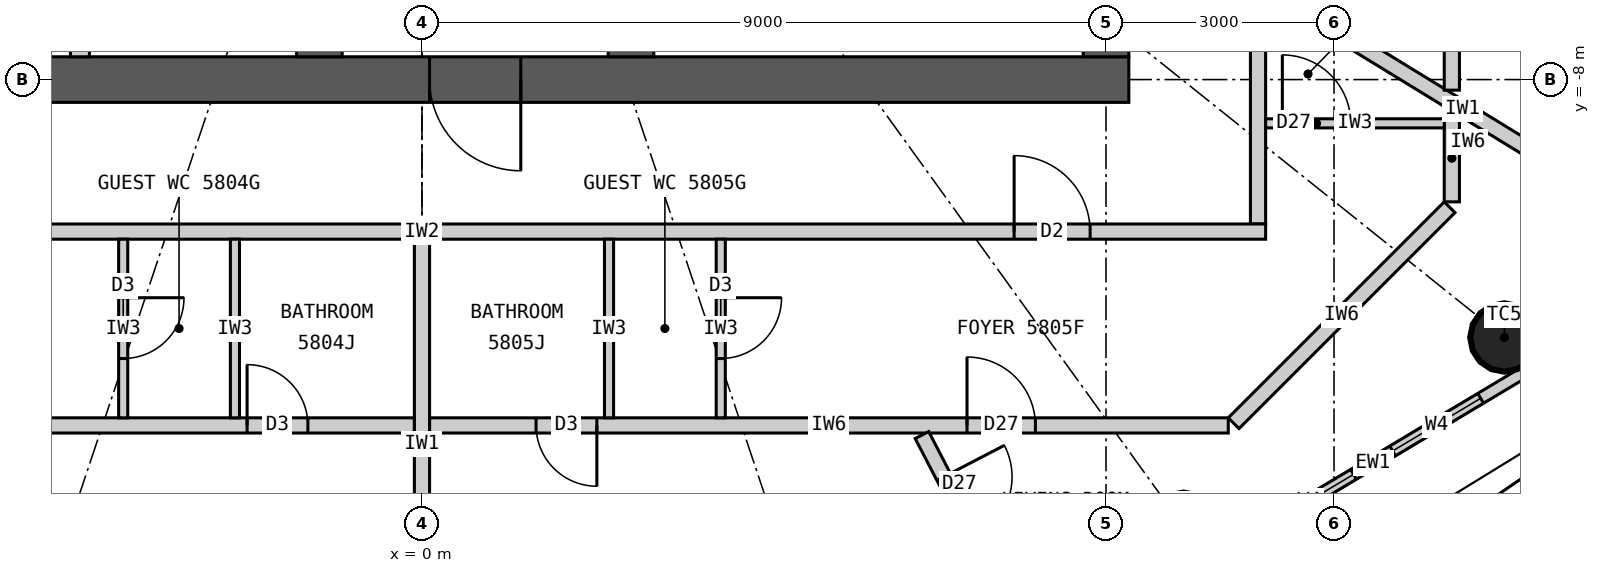
"""IFC4 building model, lengths in metres.
Left out: names, types, materials, properties, quantities, classifications, styles, units other than length and angle.
Written with IfcOpenShell. Run it as: python <this file> out.ifc"""

import sys

from ifc_helpers import new_model, si_unit, direction, frame, frame_2d, origin, origin_2d, place, context, subcontext, project, spatial, rectangle, circle, extrude, element, fill, save


model = new_model("IFC4")
c1 = context("Model", 3, precision=1e-05, world=origin(), true_north=direction((0.0, 1.0)))
c2 = subcontext(c1, "Body", "Model", "MODEL_VIEW")
j1 = project(units=[si_unit("LENGTHUNIT", "METRE"), si_unit("PLANEANGLEUNIT", "RADIAN")], contexts=[c1])
p1 = place(None, origin())
s1 = spatial("IfcSite", under=j1, at=p1, CompositionType="ELEMENT")
p2 = place(p1, origin())
s2 = spatial("IfcBuilding", under=s1, at=p2, CompositionType="ELEMENT")
p3 = place(p2, frame((0.0, 0.0, 216.0)))
s3 = spatial("IfcBuildingStorey", under=s2, at=p3, CompositionType="ELEMENT", Elevation=216.0)
for number, where, z_axis, x_axis in (
    (1, (10.019, -13.883, 0.0), (0.0, 0.0, 1.0), (1.0, 0.0, 0.0)),
    (2, (14.241, -11.393, 0.0), (0.0, 0.0, 1.0), (1.0, 0.0, 0.0)),
):
    element("IfcColumn", number, at=place(p3, frame(where, z_axis=z_axis, x_axis=x_axis)), inside=s3, PredefinedType="COLUMN", context=c2, shape_type="SweptSolid", body=[
        extrude(circle(Radius=0.45, at=origin_2d()), origin(), (0.0, 0.0, 1.0), 3.3),
    ])
p4 = place(p3, frame((9.3, -8.0, 0.0), z_axis=(0.0, 0.0, 1.0), x_axis=(-1.0, 0.0, 0.0)))
e3 = element("IfcWall", 3, at=p4, inside=s3, PredefinedType="SHEAR", context=c2, shape_type="SweptSolid", body=[
    extrude(rectangle(XDim=18.6, YDim=0.6, at=frame_2d((9.3, 0.0))), origin(), (0.0, 0.0, 1.0), 3.3),
])
p5 = place(p4, frame((8.0, 0.0, 0.0)))
e4 = element("IfcOpeningElement", 4, at=p5, cuts=e3, PredefinedType="OPENING", context=c2, shape_type="SweptSolid", body=[
    extrude(rectangle(XDim=1.2, YDim=2.2, at=frame_2d((0.6, 1.1))), frame((0.0, 0.31, 0.0), z_axis=(0.0, -1.0, 0.0), x_axis=(1.0, 0.0, 0.0)), (0.0, 0.0, 1.0), 0.62),
])
p6 = place(p4, frame((15.6, 0.0, 0.0)))
e5 = element("IfcOpeningElement", 5, at=p6, cuts=e3, PredefinedType="OPENING", context=c2, shape_type="SweptSolid", body=[
    extrude(rectangle(XDim=0.9, YDim=2.2, at=frame_2d((0.45, 1.1))), frame((0.0, 0.31, 0.0), z_axis=(0.0, -1.0, 0.0), x_axis=(1.0, 0.0, 0.0)), (0.0, 0.0, 1.0), 0.62),
])
p7 = place(p3, frame((9.0, -7.7, 0.0), z_axis=(0.0, 0.0, 1.0), x_axis=(0.0, 1.0, 0.0)))
e6 = element("IfcWall", 6, at=p7, inside=s3, PredefinedType="SHEAR", context=c2, shape_type="SweptSolid", body=[
    extrude(rectangle(XDim=15.4, YDim=0.6, at=frame_2d((7.7, 0.0))), origin(), (0.0, 0.0, 1.0), 3.3),
])
p8 = place(p7, frame((6.8, 0.0, 0.0)))
e7 = element("IfcOpeningElement", 7, at=p8, cuts=e6, PredefinedType="OPENING", context=c2, shape_type="SweptSolid", body=[
    extrude(rectangle(XDim=1.8, YDim=2.2, at=frame_2d((0.9, 1.1))), frame((0.0, 0.31, 0.0), z_axis=(0.0, -1.0, 0.0), x_axis=(1.0, 0.0, 0.0)), (0.0, 0.0, 1.0), 0.62),
])
p9 = place(p3, frame((2.75, -7.7, 0.0), z_axis=(0.0, 0.0, 1.0), x_axis=(0.0, 1.0, 0.0)))
e8 = element("IfcWall", 8, at=p9, inside=s3, PredefinedType="SHEAR", context=c2, shape_type="SweptSolid", body=[
    extrude(rectangle(XDim=3.2, YDim=0.6, at=frame_2d((1.6, 0.0))), origin(), (0.0, 0.0, 1.0), 3.3),
])
p10 = place(p9, frame((1.175, 0.0, 0.0)))
e9 = element("IfcOpeningElement", 9, at=p10, cuts=e8, PredefinedType="OPENING", context=c2, shape_type="SweptSolid", body=[
    extrude(rectangle(XDim=1.1, YDim=2.2, at=frame_2d((0.55, 1.1))), frame((0.0, 0.31, 0.0), z_axis=(0.0, -1.0, 0.0), x_axis=(1.0, 0.0, 0.0)), (0.0, 0.0, 1.0), 0.62),
])
p11 = place(p3, frame((-1.35, -7.7, 0.0), z_axis=(0.0, 0.0, 1.0), x_axis=(0.0, 1.0, 0.0)))
e10 = element("IfcWall", 10, at=p11, inside=s3, PredefinedType="SHEAR", context=c2, shape_type="SweptSolid", body=[
    extrude(rectangle(XDim=3.2, YDim=0.6, at=frame_2d((1.6, 0.0))), origin(), (0.0, 0.0, 1.0), 3.3),
])
p12 = place(p11, frame((1.05, 0.0, 0.0)))
e11 = element("IfcOpeningElement", 11, at=p12, cuts=e10, PredefinedType="OPENING", context=c2, shape_type="SweptSolid", body=[
    extrude(rectangle(XDim=1.1, YDim=2.2, at=frame_2d((0.55, 1.1))), frame((0.0, 0.31, 0.0), z_axis=(0.0, -1.0, 0.0), x_axis=(1.0, 0.0, 0.0)), (0.0, 0.0, 1.0), 0.62),
])
p13 = place(p3, frame((-4.5, -7.7, 0.0), z_axis=(0.0, 0.0, 1.0), x_axis=(0.0, 1.0, 0.0)))
e12 = element("IfcWall", 12, at=p13, inside=s3, PredefinedType="PARTITIONING", context=c2, shape_type="SweptSolid", body=[
    extrude(rectangle(XDim=3.2, YDim=0.25, at=frame_2d((1.6, 0.0))), origin(), (0.0, 0.0, 1.0), 3.3),
])
p14 = place(p3, frame((10.346, -14.336, 0.0), z_axis=(0.0, 0.0, 1.0), x_axis=(0.85822150553, 0.513279502265, 0.0)))
e13 = element("IfcWall", 13, at=p14, inside=s3, PredefinedType="ELEMENTEDWALL", context=c2, shape_type="SweptSolid", body=[
    extrude(rectangle(XDim=5.05, YDim=0.15, at=frame_2d((2.525, 0.0))), origin(), (0.0, 0.0, 1.0), 3.12),
])
p15 = place(p14, frame((0.875, 0.0, 0.9)))
e14 = element("IfcOpeningElement", 14, at=p15, cuts=e13, PredefinedType="OPENING", context=c2, shape_type="SweptSolid", body=[
    extrude(rectangle(XDim=1.35, YDim=1.9, at=frame_2d((0.675, 0.95))), frame((0.0, 0.085, 0.0), z_axis=(0.0, -1.0, 0.0), x_axis=(1.0, 0.0, 0.0)), (0.0, 0.0, 1.0), 0.17),
])
p16 = place(p14, frame((2.825, 0.0, 0.9)))
e15 = element("IfcOpeningElement", 15, at=p16, cuts=e13, PredefinedType="OPENING", context=c2, shape_type="SweptSolid", body=[
    extrude(rectangle(XDim=1.35, YDim=1.9, at=frame_2d((0.675, 0.95))), frame((0.0, 0.085, 0.0), z_axis=(0.0, -1.0, 0.0), x_axis=(1.0, 0.0, 0.0)), (0.0, 0.0, 1.0), 0.17),
])
p17 = place(p3, frame((11.0, -9.9, 0.0), z_axis=(0.0, 0.0, 1.0), x_axis=(0.0, 1.0, 0.0)))
e16 = element("IfcWall", 16, at=p17, inside=s3, PredefinedType="PARTITIONING", context=c2, shape_type="SweptSolid", body=[
    extrude(rectangle(XDim=7.416, YDim=0.2, at=frame_2d((3.708, 0.0))), origin(), (0.0, 0.0, 1.0), 3.12),
])
p18 = place(p3, frame((11.1, -10.0, 0.0), z_axis=(0.0, 0.0, 1.0), x_axis=(-1.0, 0.0, 0.0)))
e17 = element("IfcWall", 17, at=p18, inside=s3, PredefinedType="PARTITIONING", context=c2, shape_type="SweptSolid", body=[
    extrude(rectangle(XDim=22.2, YDim=0.2, at=frame_2d((11.1, 0.0))), origin(), (0.0, 0.0, 1.0), 3.12),
])
p19 = place(p18, frame((18.864, 0.0, 0.0)))
e18 = element("IfcOpeningElement", 18, at=p19, cuts=e17, PredefinedType="OPENING", context=c2, shape_type="SweptSolid", body=[
    extrude(rectangle(XDim=1.0, YDim=2.2, at=frame_2d((0.5, 1.1))), frame((0.0, 0.11, 0.0), z_axis=(0.0, -1.0, 0.0), x_axis=(1.0, 0.0, 0.0)), (0.0, 0.0, 1.0), 0.22),
])
p20 = place(p18, frame((2.309, 0.0, 0.0)))
e19 = element("IfcOpeningElement", 19, at=p20, cuts=e17, PredefinedType="OPENING", context=c2, shape_type="SweptSolid", body=[
    extrude(rectangle(XDim=1.0, YDim=2.2, at=frame_2d((0.5, 1.1))), frame((0.0, 0.11, 0.0), z_axis=(0.0, -1.0, 0.0), x_axis=(1.0, 0.0, 0.0)), (0.0, 0.0, 1.0), 0.22),
])
p21 = place(p3, frame((0.0, -10.1, 0.0), z_axis=(0.0, 0.0, 1.0), x_axis=(0.0, -1.0, 0.0)))
e20 = element("IfcWall", 20, at=p21, inside=s3, PredefinedType="PARTITIONING", context=c2, shape_type="SweptSolid", body=[
    extrude(rectangle(XDim=5.4, YDim=0.2, at=frame_2d((2.7, 0.0))), origin(), (0.0, 0.0, 1.0), 2.42),
])
p22 = place(p3, frame((11.1, -6.797, 0.0), z_axis=(0.0, 0.0, 1.0), x_axis=(0.852799818179, -0.522237943963, 0.0)))
e21 = element("IfcWall", 21, at=p22, inside=s3, PredefinedType="PARTITIONING", context=c2, shape_type="SweptSolid", body=[
    extrude(rectangle(XDim=6.077, YDim=0.2, at=frame_2d((3.039, 0.0))), origin(), (0.0, 0.0, 1.0), 3.12),
])
p23 = place(p3, frame((-10.609, -12.55, 0.0), z_axis=(0.0, 0.0, 1.0), x_axis=(1.0, 0.0, 0.0)))
e22 = element("IfcWall", 22, at=p23, inside=s3, PredefinedType="PARTITIONING", context=c2, shape_type="SweptSolid", body=[
    extrude(rectangle(XDim=10.508, YDim=0.2, at=frame_2d((5.254, 0.0))), origin(), (0.0, 0.0, 1.0), 3.12),
])
p24 = place(p23, frame((8.308, 0.0, 0.0)))
e23 = element("IfcOpeningElement", 23, at=p24, cuts=e22, PredefinedType="OPENING", context=c2, shape_type="SweptSolid", body=[
    extrude(rectangle(XDim=0.8, YDim=2.1, at=frame_2d((0.4, 1.05))), frame((0.0, 0.11, 0.0), z_axis=(0.0, -1.0, 0.0), x_axis=(1.0, 0.0, 0.0)), (0.0, 0.0, 1.0), 0.22),
])
p25 = place(p3, frame((-3.931, -10.1, 0.0), z_axis=(0.0, 0.0, 1.0), x_axis=(0.0, -1.0, 0.0)))
e24 = element("IfcWall", 24, at=p25, inside=s3, PredefinedType="PARTITIONING", context=c2, shape_type="SweptSolid", body=[
    extrude(rectangle(XDim=2.35, YDim=0.12, at=frame_2d((1.175, 0.0))), origin(), (0.0, 0.0, 1.0), 3.12),
])
p26 = place(p25, frame((0.77, 0.0, 0.0)))
e25 = element("IfcOpeningElement", 25, at=p26, cuts=e24, PredefinedType="OPENING", context=c2, shape_type="SweptSolid", body=[
    extrude(rectangle(XDim=0.8, YDim=2.1, at=frame_2d((0.4, 1.05))), frame((0.0, 0.07, 0.0), z_axis=(0.0, -1.0, 0.0), x_axis=(1.0, 0.0, 0.0)), (0.0, 0.0, 1.0), 0.14),
])
p27 = place(p3, frame((-2.461, -10.1, 0.0), z_axis=(0.0, 0.0, 1.0), x_axis=(0.0, -1.0, 0.0)))
e26 = element("IfcWall", 26, at=p27, inside=s3, PredefinedType="PARTITIONING", context=c2, shape_type="SweptSolid", body=[
    extrude(rectangle(XDim=2.35, YDim=0.12, at=frame_2d((1.175, 0.0))), origin(), (0.0, 0.0, 1.0), 3.12),
])
p28 = place(p3, frame((0.101, -12.55, 0.0), z_axis=(0.0, 0.0, 1.0), x_axis=(1.0, 0.0, 0.0)))
e27 = element("IfcWall", 27, at=p28, inside=s3, PredefinedType="PARTITIONING", context=c2, shape_type="SweptSolid", body=[
    extrude(rectangle(XDim=10.508, YDim=0.2, at=frame_2d((5.254, 0.0))), origin(), (0.0, 0.0, 1.0), 3.12),
])
p29 = place(p28, frame((1.4, 0.0, 0.0)))
e28 = element("IfcOpeningElement", 28, at=p29, cuts=e27, PredefinedType="OPENING", context=c2, shape_type="SweptSolid", body=[
    extrude(rectangle(XDim=0.8, YDim=2.1, at=frame_2d((0.4, 1.05))), frame((0.0, 0.11, 0.0), z_axis=(0.0, -1.0, 0.0), x_axis=(1.0, 0.0, 0.0)), (0.0, 0.0, 1.0), 0.22),
])
p30 = place(p28, frame((7.07, 0.0, 0.0)))
e29 = element("IfcOpeningElement", 29, at=p30, cuts=e27, PredefinedType="OPENING", context=c2, shape_type="SweptSolid", body=[
    extrude(rectangle(XDim=0.9, YDim=2.1, at=frame_2d((0.45, 1.05))), frame((0.0, 0.11, 0.0), z_axis=(0.0, -1.0, 0.0), x_axis=(1.0, 0.0, 0.0)), (0.0, 0.0, 1.0), 0.22),
])
p31 = place(p3, frame((10.679, -12.521, 0.0), z_axis=(0.0, 0.0, 1.0), x_axis=(0.707106781187, 0.707106781187, 0.0)))
e30 = element("IfcWall", 30, at=p31, inside=s3, PredefinedType="PARTITIONING", context=c2, shape_type="SweptSolid", body=[
    extrude(rectangle(XDim=4.019, YDim=0.2, at=frame_2d((2.009, 0.0))), origin(), (0.0, 0.0, 1.0), 3.12),
])
p32 = place(p3, frame((13.55, -9.609, 0.0), z_axis=(0.0, 0.0, 1.0), x_axis=(0.0, 1.0, 0.0)))
e31 = element("IfcWall", 31, at=p32, inside=s3, PredefinedType="PARTITIONING", context=c2, shape_type="SweptSolid", body=[
    extrude(rectangle(XDim=1.148, YDim=0.2, at=frame_2d((0.574, 0.0))), origin(), (0.0, 0.0, 1.0), 3.12),
])
p33 = place(p3, frame((6.578, -12.677, 0.0), z_axis=(0.0, 0.0, 1.0), x_axis=(0.460620531465, -0.887597164255, 0.0)))
e32 = element("IfcWall", 32, at=p33, inside=s3, PredefinedType="PARTITIONING", context=c2, shape_type="SweptSolid", body=[
    extrude(rectangle(XDim=2.678, YDim=0.2, at=frame_2d((1.339, 0.0))), origin(), (0.0, 0.0, 1.0), 3.12),
])
p34 = place(p33, frame((0.62, 0.0, 0.0)))
e33 = element("IfcOpeningElement", 33, at=p34, cuts=e32, PredefinedType="OPENING", context=c2, shape_type="SweptSolid", body=[
    extrude(rectangle(XDim=0.9, YDim=2.1, at=frame_2d((0.45, 1.05))), frame((0.0, 0.11, 0.0), z_axis=(0.0, -1.0, 0.0), x_axis=(1.0, 0.0, 0.0)), (0.0, 0.0, 1.0), 0.22),
])
p35 = place(p3, frame((2.461, -10.1, 0.0), z_axis=(0.0, 0.0, 1.0), x_axis=(0.0, -1.0, 0.0)))
e34 = element("IfcWall", 34, at=p35, inside=s3, PredefinedType="PARTITIONING", context=c2, shape_type="SweptSolid", body=[
    extrude(rectangle(XDim=2.35, YDim=0.12, at=frame_2d((1.175, 0.0))), origin(), (0.0, 0.0, 1.0), 3.12),
])
p36 = place(p3, frame((3.931, -10.1, 0.0), z_axis=(0.0, 0.0, 1.0), x_axis=(0.0, -1.0, 0.0)))
e35 = element("IfcWall", 35, at=p36, inside=s3, PredefinedType="PARTITIONING", context=c2, shape_type="SweptSolid", body=[
    extrude(rectangle(XDim=2.35, YDim=0.12, at=frame_2d((1.175, 0.0))), origin(), (0.0, 0.0, 1.0), 3.12),
])
p37 = place(p36, frame((0.77, 0.0, 0.0)))
e36 = element("IfcOpeningElement", 36, at=p37, cuts=e35, PredefinedType="OPENING", context=c2, shape_type="SweptSolid", body=[
    extrude(rectangle(XDim=0.8, YDim=2.1, at=frame_2d((0.4, 1.05))), frame((0.0, 0.07, 0.0), z_axis=(0.0, -1.0, 0.0), x_axis=(1.0, 0.0, 0.0)), (0.0, 0.0, 1.0), 0.14),
])
p38 = place(p3, frame((11.1, -8.576, 0.0), z_axis=(0.0, 0.0, 1.0), x_axis=(1.0, 0.0, 0.0)))
e37 = element("IfcWall", 37, at=p38, inside=s3, PredefinedType="PARTITIONING", context=c2, shape_type="SweptSolid", body=[
    extrude(rectangle(XDim=2.35, YDim=0.12, at=frame_2d((1.175, 0.0))), origin(), (0.0, 0.0, 1.0), 3.12),
])
p39 = place(p38, frame((0.22, 0.0, 0.0)))
e38 = element("IfcOpeningElement", 38, at=p39, cuts=e37, PredefinedType="OPENING", context=c2, shape_type="SweptSolid", body=[
    extrude(rectangle(XDim=0.9, YDim=2.1, at=frame_2d((0.45, 1.05))), frame((0.0, 0.07, 0.0), z_axis=(0.0, -1.0, 0.0), x_axis=(1.0, 0.0, 0.0)), (0.0, 0.0, 1.0), 0.14),
])
p40 = place(p3, frame((13.55, -8.139, 0.0), z_axis=(0.0, 0.0, 1.0), x_axis=(0.0, 1.0, 0.0)))
e39 = element("IfcWall", 39, at=p40, inside=s3, PredefinedType="PARTITIONING", context=c2, shape_type="SweptSolid", body=[
    extrude(rectangle(XDim=12.496, YDim=0.2, at=frame_2d((6.248, 0.0))), origin(), (0.0, 0.0, 1.0), 3.12),
])
p41 = place(p40, frame((2.42, 0.0, 0.0)))
e40 = element("IfcOpeningElement", 40, at=p41, cuts=e39, PredefinedType="OPENING", context=c2, shape_type="SweptSolid", body=[
    extrude(rectangle(XDim=0.8, YDim=2.1, at=frame_2d((0.4, 1.05))), frame((0.0, 0.11, 0.0), z_axis=(0.0, -1.0, 0.0), x_axis=(1.0, 0.0, 0.0)), (0.0, 0.0, 1.0), 0.22),
])
p42 = place(p40, frame((9.776, 0.0, 0.0)))
e41 = element("IfcOpeningElement", 41, at=p42, cuts=e39, PredefinedType="OPENING", context=c2, shape_type="SweptSolid", body=[
    extrude(rectangle(XDim=0.8, YDim=2.1, at=frame_2d((0.4, 1.05))), frame((0.0, 0.11, 0.0), z_axis=(0.0, -1.0, 0.0), x_axis=(1.0, 0.0, 0.0)), (0.0, 0.0, 1.0), 0.22),
])
p43 = place(p40, frame((5.82, 0.0, 0.0)))
e42 = element("IfcOpeningElement", 42, at=p43, cuts=e39, PredefinedType="OPENING", context=c2, shape_type="SweptSolid", body=[
    extrude(rectangle(XDim=0.9, YDim=2.1, at=frame_2d((0.45, 1.05))), frame((0.0, 0.11, 0.0), z_axis=(0.0, -1.0, 0.0), x_axis=(1.0, 0.0, 0.0)), (0.0, 0.0, 1.0), 0.22),
])
p44 = place(p15, origin())
e43 = element("IfcWindow", 43, at=p44, inside=s3, PartitioningType="SINGLE_PANEL", PredefinedType="WINDOW", context=c2, shape_type="SweptSolid", body=[
    extrude(rectangle(XDim=1.35, YDim=1.9, at=frame_2d((0.675, 0.95))), frame((0.0, 0.03, 0.0), z_axis=(0.0, -1.0, 0.0), x_axis=(1.0, 0.0, 0.0)), (0.0, 0.0, 1.0), 0.06),
])
fill(e14, e43)
p45 = place(p16, origin())
e44 = element("IfcWindow", 44, at=p45, inside=s3, PartitioningType="SINGLE_PANEL", PredefinedType="WINDOW", context=c2, shape_type="SweptSolid", body=[
    extrude(rectangle(XDim=1.35, YDim=1.9, at=frame_2d((0.675, 0.95))), frame((0.0, 0.03, 0.0), z_axis=(0.0, -1.0, 0.0), x_axis=(1.0, 0.0, 0.0)), (0.0, 0.0, 1.0), 0.06),
])
fill(e15, e44)
p46 = place(p26, origin())
e45 = element("IfcDoor", 45, at=p46, inside=s3, OperationType="SINGLE_SWING_LEFT", PredefinedType="DOOR", context=c2, shape_type="SweptSolid", body=[
    extrude(rectangle(XDim=0.8, YDim=2.1, at=frame_2d((0.4, 1.05))), frame((0.0, 0.025, 0.0), z_axis=(0.0, -1.0, 0.0), x_axis=(1.0, 0.0, 0.0)), (0.0, 0.0, 1.0), 0.05),
])
fill(e25, e45)
p47 = place(p24, origin())
e46 = element("IfcDoor", 46, at=p47, inside=s3, OperationType="SINGLE_SWING_LEFT", PredefinedType="DOOR", context=c2, shape_type="SweptSolid", body=[
    extrude(rectangle(XDim=0.8, YDim=2.1, at=frame_2d((0.4, 1.05))), frame((0.0, 0.025, 0.0), z_axis=(0.0, -1.0, 0.0), x_axis=(1.0, 0.0, 0.0)), (0.0, 0.0, 1.0), 0.05),
])
fill(e23, e46)
p48 = place(p20, origin())
e47 = element("IfcDoor", 47, at=p48, inside=s3, OperationType="SINGLE_SWING_RIGHT", PredefinedType="DOOR", context=c2, shape_type="SweptSolid", body=[
    extrude(rectangle(XDim=1.0, YDim=2.2, at=frame_2d((0.5, 1.1))), frame((0.0, 0.025, 0.0), z_axis=(0.0, -1.0, 0.0), x_axis=(1.0, 0.0, 0.0)), (0.0, 0.0, 1.0), 0.05),
])
fill(e19, e47)
p49 = place(p29, origin())
e48 = element("IfcDoor", 48, at=p49, inside=s3, OperationType="SINGLE_SWING_RIGHT", PredefinedType="DOOR", context=c2, shape_type="SweptSolid", body=[
    extrude(rectangle(XDim=0.8, YDim=2.1, at=frame_2d((0.4, 1.05))), frame((0.0, 0.025, 0.0), z_axis=(0.0, -1.0, 0.0), x_axis=(1.0, 0.0, 0.0)), (0.0, 0.0, 1.0), 0.05),
])
fill(e28, e48)
p50 = place(p37, origin())
e49 = element("IfcDoor", 49, at=p50, inside=s3, OperationType="SINGLE_SWING_LEFT", PredefinedType="DOOR", context=c2, shape_type="SweptSolid", body=[
    extrude(rectangle(XDim=0.8, YDim=2.1, at=frame_2d((0.4, 1.05))), frame((0.0, 0.025, 0.0), z_axis=(0.0, -1.0, 0.0), x_axis=(1.0, 0.0, 0.0)), (0.0, 0.0, 1.0), 0.05),
])
fill(e36, e49)
p51 = place(p39, origin())
e50 = element("IfcDoor", 50, at=p51, inside=s3, OperationType="SINGLE_SWING_LEFT", PredefinedType="DOOR", context=c2, shape_type="SweptSolid", body=[
    extrude(rectangle(XDim=0.9, YDim=2.1, at=frame_2d((0.45, 1.05))), frame((0.0, 0.025, 0.0), z_axis=(0.0, -1.0, 0.0), x_axis=(1.0, 0.0, 0.0)), (0.0, 0.0, 1.0), 0.05),
])
fill(e38, e50)
p52 = place(p30, origin())
e51 = element("IfcDoor", 51, at=p52, inside=s3, OperationType="SINGLE_SWING_LEFT", PredefinedType="DOOR", context=c2, shape_type="SweptSolid", body=[
    extrude(rectangle(XDim=0.9, YDim=2.1, at=frame_2d((0.45, 1.05))), frame((0.0, 0.025, 0.0), z_axis=(0.0, -1.0, 0.0), x_axis=(1.0, 0.0, 0.0)), (0.0, 0.0, 1.0), 0.05),
])
fill(e29, e51)
p53 = place(p34, origin())
e52 = element("IfcDoor", 52, at=p53, inside=s3, OperationType="SINGLE_SWING_LEFT", PredefinedType="DOOR", context=c2, shape_type="SweptSolid", body=[
    extrude(rectangle(XDim=0.9, YDim=2.1, at=frame_2d((0.45, 1.05))), frame((0.0, 0.025, 0.0), z_axis=(0.0, -1.0, 0.0), x_axis=(1.0, 0.0, 0.0)), (0.0, 0.0, 1.0), 0.05),
])
fill(e33, e52)
p54 = place(p5, origin())
e53 = element("IfcDoor", 53, at=p54, inside=s3, OperationType="SINGLE_SWING_LEFT", PredefinedType="DOOR", context=c2, shape_type="SweptSolid", body=[
    extrude(rectangle(XDim=1.2, YDim=2.2, at=frame_2d((0.6, 1.1))), frame((0.0, 0.025, 0.0), z_axis=(0.0, -1.0, 0.0), x_axis=(1.0, 0.0, 0.0)), (0.0, 0.0, 1.0), 0.05),
])
fill(e4, e53)
save(model, sys.argv[1])
